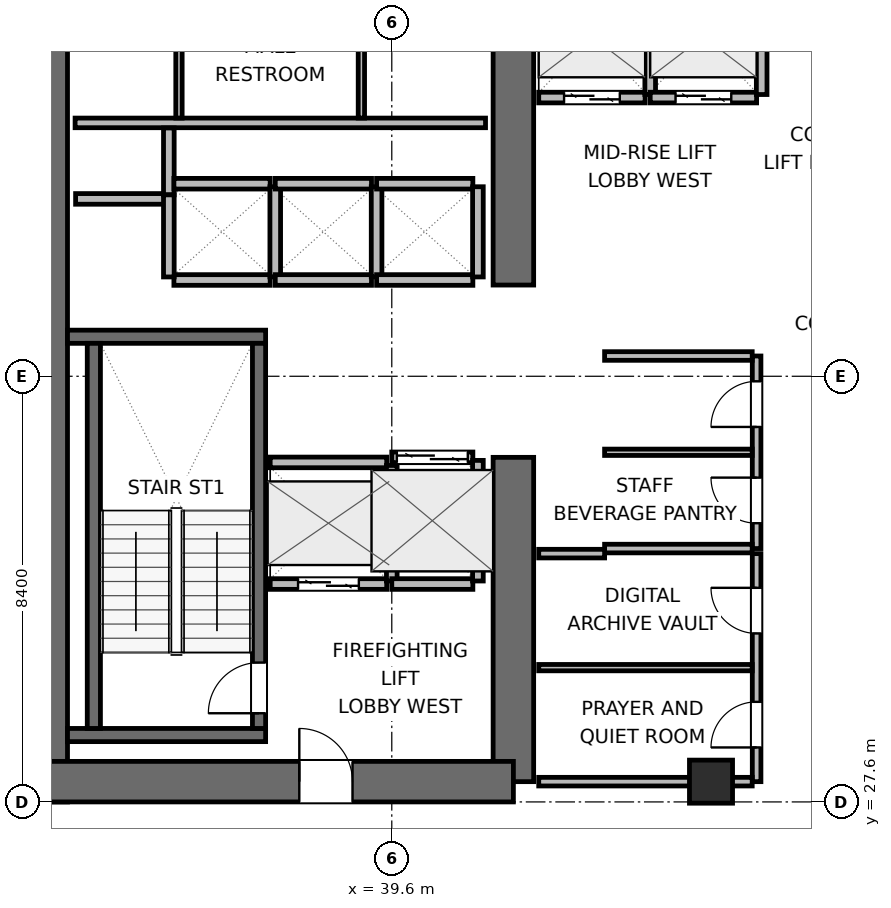
"""IFC4 building model, lengths in metres.
Left out: names, types, materials, properties, quantities, classifications, styles, units other than length and angle.
Written with IfcOpenShell. Run it as: python <this file> out.ifc"""

import sys

from ifc_helpers import new_model, si_unit, direction, frame, frame_2d, origin, origin_2d, place, context, subcontext, project, spatial, rectangle, extrude, element, fill, save


model = new_model("IFC4")
c1 = context("Model", 3, precision=1e-05, world=origin(), true_north=direction((0.0, 1.0)))
c2 = subcontext(c1, "Body", "Model", "MODEL_VIEW")
j1 = project(units=[si_unit("LENGTHUNIT", "METRE"), si_unit("PLANEANGLEUNIT", "RADIAN")], contexts=[c1])
p1 = place(None, origin())
s1 = spatial("IfcSite", under=j1, at=p1, CompositionType="ELEMENT")
p2 = place(p1, origin())
s2 = spatial("IfcBuilding", under=s1, at=p2, CompositionType="ELEMENT")
p3 = place(p2, frame((0.0, 0.0, 141.6)))
s3 = spatial("IfcBuildingStorey", under=s2, at=p3, CompositionType="ELEMENT", Elevation=141.6)
p4 = place(p3, frame((32.8, 27.6, 0.0), z_axis=(0.0, 0.0, 1.0), x_axis=(0.0, 1.0, 0.0)))
e1 = element("IfcWall", 1, at=p4, inside=s3, PredefinedType="SHEAR", context=c2, shape_type="SweptSolid", body=[
    extrude(rectangle(XDim=16.8, YDim=0.8, at=frame_2d((8.4, 0.0))), origin(), (0.0, 0.0, 1.0), 3.9),
])
p5 = place(p3, frame((42.0, 28.0, 0.0), z_axis=(0.0, 0.0, 1.0), x_axis=(0.0, 1.0, 0.0)))
e2 = element("IfcWall", 2, at=p5, inside=s3, PredefinedType="SHEAR", context=c2, shape_type="SweptSolid", body=[
    extrude(rectangle(XDim=6.4, YDim=0.8, at=frame_2d((3.2, 0.0))), origin(), (0.0, 0.0, 1.0), 3.9),
])
p6 = place(p3, frame((42.0, 37.8, 0.0), z_axis=(0.0, 0.0, 1.0), x_axis=(0.0, 1.0, 0.0)))
e3 = element("IfcWall", 3, at=p6, inside=s3, PredefinedType="SHEAR", context=c2, shape_type="SweptSolid", body=[
    extrude(rectangle(XDim=6.2, YDim=0.8, at=frame_2d((3.1, 0.0))), origin(), (0.0, 0.0, 1.0), 3.9),
])
p7 = place(p3, frame((32.8, 28.0, 0.0), z_axis=(0.0, 0.0, 1.0), x_axis=(1.0, 0.0, 0.0)))
e4 = element("IfcWall", 4, at=p7, inside=s3, PredefinedType="SHEAR", context=c2, shape_type="SweptSolid", body=[
    extrude(rectangle(XDim=9.2, YDim=0.8, at=frame_2d((4.6, 0.0))), origin(), (0.0, 0.0, 1.0), 3.9),
])
p8 = place(p7, frame((4.975, 0.0, 0.0)))
e5 = element("IfcOpeningElement", 5, at=p8, cuts=e4, PredefinedType="OPENING", context=c2, shape_type="SweptSolid", body=[
    extrude(rectangle(XDim=1.05, YDim=2.04, at=frame_2d((0.525, 1.02))), frame((0.0, 0.41, 0.0), z_axis=(0.0, -1.0, 0.0), x_axis=(1.0, 0.0, 0.0)), (0.0, 0.0, 1.0), 0.82),
])
for number, where, z_axis, x_axis in (
    (6, (33.2, 28.92, 0.0), (0.0, 0.0, 1.0), (1.0, 0.0, 0.0)),
    (7, (33.2, 36.78, 0.0), (0.0, 0.0, 1.0), (1.0, 0.0, 0.0)),
):
    element("IfcWall", number, at=place(p3, frame(where, z_axis=z_axis, x_axis=x_axis)), inside=s3, PredefinedType="SHEAR", context=c2, shape_type="SweptSolid", body=[
        extrude(rectangle(XDim=3.91, YDim=0.26, at=frame_2d((1.955, 0.0))), origin(), (0.0, 0.0, 1.0), 3.9),
    ])
p9 = place(p3, frame((33.72, 29.05, 0.0), z_axis=(0.0, 0.0, 1.0), x_axis=(0.0, 1.0, 0.0)))
e8 = element("IfcWall", 8, at=p9, inside=s3, PredefinedType="SHEAR", context=c2, shape_type="SweptSolid", body=[
    extrude(rectangle(XDim=7.6, YDim=0.26, at=frame_2d((3.8, 0.0))), origin(), (0.0, 0.0, 1.0), 3.9),
])
p10 = place(p3, frame((36.98, 29.05, 0.0), z_axis=(0.0, 0.0, 1.0), x_axis=(0.0, 1.0, 0.0)))
e9 = element("IfcWall", 9, at=p10, inside=s3, PredefinedType="SHEAR", context=c2, shape_type="SweptSolid", body=[
    extrude(rectangle(XDim=7.6, YDim=0.26, at=frame_2d((3.8, 0.0))), origin(), (0.0, 0.0, 1.0), 3.9),
])
p11 = place(p10, frame((0.3, 0.0, 0.0)))
e10 = element("IfcOpeningElement", 10, at=p11, cuts=e9, PredefinedType="OPENING", context=c2, shape_type="SweptSolid", body=[
    extrude(rectangle(XDim=1.0, YDim=2.04, at=frame_2d((0.5, 1.02))), frame((0.0, 0.14, 0.0), z_axis=(0.0, -1.0, 0.0), x_axis=(1.0, 0.0, 0.0)), (0.0, 0.0, 1.0), 0.28),
])
p12 = place(p3, frame((45.9, 28.0, 0.0), z_axis=(0.0, 0.0, 1.0), x_axis=(1.0, 0.0, 0.0)))
e11 = element("IfcColumn", 11, at=p12, inside=s3, PredefinedType="COLUMN", context=c2, shape_type="SweptSolid", body=[
    extrude(rectangle(XDim=0.85, YDim=0.85, at=origin_2d()), origin(), (0.0, 0.0, 1.0), 3.9),
])
p13 = place(p3, frame((33.35, 41.0, 0.0), z_axis=(0.0, 0.0, 1.0), x_axis=(1.0, 0.0, 0.0)))
e12 = element("IfcWall", 12, at=p13, inside=s3, PredefinedType="PLUMBINGWALL", context=c2, shape_type="SweptSolid", body=[
    extrude(rectangle(XDim=8.1, YDim=0.19, at=frame_2d((4.05, 0.0))), origin(), (0.0, 0.0, 1.0), 3.6),
])
for number, where, z_axis, x_axis in (
    (13, (35.4, 41.095, 0.0), (0.0, 0.0, 1.0), (0.0, 1.0, 0.0)),
    (14, (39.0, 41.095, 0.0), (0.0, 0.0, 1.0), (0.0, 1.0, 0.0)),
):
    element("IfcWall", number, at=place(p3, frame(where, z_axis=z_axis, x_axis=x_axis)), inside=s3, PredefinedType="PARTITIONING", context=c2, shape_type="SweptSolid", body=[
        extrude(rectangle(XDim=2.355, YDim=0.125, at=frame_2d((1.177, 0.0))), origin(), (0.0, 0.0, 1.0), 3.6),
    ])
p14 = place(p3, frame((33.36, 39.5, 0.0), z_axis=(0.0, 0.0, 1.0), x_axis=(1.0, 0.0, 0.0)))
e15 = element("IfcWall", 15, at=p14, inside=s3, PredefinedType="PARTITIONING", context=c2, shape_type="SweptSolid", body=[
    extrude(rectangle(XDim=1.86, YDim=0.21, at=frame_2d((0.93, 0.0))), origin(), (0.0, 0.0, 1.0), 3.6),
])
p15 = place(p3, frame((35.2, 39.58, 0.0), z_axis=(0.0, 0.0, 1.0), x_axis=(0.0, 1.0, 0.0)))
e16 = element("IfcWall", 16, at=p15, inside=s3, PredefinedType="PARTITIONING", context=c2, shape_type="SweptSolid", body=[
    extrude(rectangle(XDim=1.32, YDim=0.21, at=frame_2d((0.66, 0.0))), origin(), (0.0, 0.0, 1.0), 3.6),
])
p16 = place(p3, frame((37.2, 31.9, 0.0), z_axis=(0.0, 0.0, 1.0), x_axis=(1.0, 0.0, 0.0)))
e17 = element("IfcWall", 17, at=p16, inside=s3, PredefinedType="PARTITIONING", context=c2, shape_type="SweptSolid", body=[
    extrude(rectangle(XDim=2.3, YDim=0.21, at=frame_2d((1.15, 0.0))), origin(), (0.0, 0.0, 1.0), 3.6),
])
p17 = place(p16, frame((0.55, 0.0, 0.0)))
e18 = element("IfcOpeningElement", 18, at=p17, cuts=e17, PredefinedType="OPENING", context=c2, shape_type="SweptSolid", body=[
    extrude(rectangle(XDim=1.2, YDim=2.04, at=frame_2d((0.6, 1.02))), frame((0.0, 0.115, 0.0), z_axis=(0.0, -1.0, 0.0), x_axis=(1.0, 0.0, 0.0)), (0.0, 0.0, 1.0), 0.23),
])
p18 = place(p3, frame((37.2, 34.3, 0.0), z_axis=(0.0, 0.0, 1.0), x_axis=(1.0, 0.0, 0.0)))
e19 = element("IfcWall", 19, at=p18, inside=s3, PredefinedType="PARTITIONING", context=c2, shape_type="SweptSolid", body=[
    extrude(rectangle(XDim=2.3, YDim=0.21, at=frame_2d((1.15, 0.0))), origin(), (0.0, 0.0, 1.0), 3.6),
])
p19 = place(p3, frame((39.6, 31.96, 0.0), z_axis=(0.0, 0.0, 1.0), x_axis=(0.0, 1.0, 0.0)))
e20 = element("IfcWall", 20, at=p19, inside=s3, PredefinedType="PARTITIONING", context=c2, shape_type="SweptSolid", body=[
    extrude(rectangle(XDim=2.28, YDim=0.21, at=frame_2d((1.14, 0.0))), origin(), (0.0, 0.0, 1.0), 3.6),
])
p20 = place(p3, frame((39.6, 34.4, 0.0), z_axis=(0.0, 0.0, 1.0), x_axis=(1.0, 0.0, 0.0)))
e21 = element("IfcWall", 21, at=p20, inside=s3, PredefinedType="PARTITIONING", context=c2, shape_type="SweptSolid", body=[
    extrude(rectangle(XDim=1.6, YDim=0.21, at=frame_2d((0.8, 0.0))), origin(), (0.0, 0.0, 1.0), 3.6),
])
p21 = place(p20, frame((0.1, 0.0, 0.0)))
e22 = element("IfcOpeningElement", 22, at=p21, cuts=e21, PredefinedType="OPENING", context=c2, shape_type="SweptSolid", body=[
    extrude(rectangle(XDim=1.4, YDim=2.06, at=frame_2d((0.7, 1.03))), frame((0.0, 0.115, 0.0), z_axis=(0.0, -1.0, 0.0), x_axis=(1.0, 0.0, 0.0)), (0.0, 0.0, 1.0), 0.23),
])
p22 = place(p3, frame((39.6, 31.9, 0.0), z_axis=(0.0, 0.0, 1.0), x_axis=(1.0, 0.0, 0.0)))
e23 = element("IfcWall", 23, at=p22, inside=s3, PredefinedType="PARTITIONING", context=c2, shape_type="SweptSolid", body=[
    extrude(rectangle(XDim=1.6, YDim=0.21, at=frame_2d((0.8, 0.0))), origin(), (0.0, 0.0, 1.0), 3.6),
])
p23 = place(p3, frame((41.3, 31.96, 0.0), z_axis=(0.0, 0.0, 1.0), x_axis=(0.0, 1.0, 0.0)))
e24 = element("IfcWall", 24, at=p23, inside=s3, PredefinedType="PARTITIONING", context=c2, shape_type="SweptSolid", body=[
    extrude(rectangle(XDim=2.38, YDim=0.21, at=frame_2d((1.19, 0.0))), origin(), (0.0, 0.0, 1.0), 3.6),
])
p24 = place(p3, frame((42.5, 41.5, 0.0), z_axis=(0.0, 0.0, 1.0), x_axis=(1.0, 0.0, 0.0)))
e25 = element("IfcWall", 25, at=p24, inside=s3, PredefinedType="PARTITIONING", context=c2, shape_type="SweptSolid", body=[
    extrude(rectangle(XDim=2.1, YDim=0.21, at=frame_2d((1.05, 0.0))), origin(), (0.0, 0.0, 1.0), 3.6),
])
p25 = place(p24, frame((0.5, 0.0, 0.0)))
e26 = element("IfcOpeningElement", 26, at=p25, cuts=e25, PredefinedType="OPENING", context=c2, shape_type="SweptSolid", body=[
    extrude(rectangle(XDim=1.1, YDim=2.04, at=frame_2d((0.55, 1.02))), frame((0.0, 0.115, 0.0), z_axis=(0.0, -1.0, 0.0), x_axis=(1.0, 0.0, 0.0)), (0.0, 0.0, 1.0), 0.23),
])
p26 = place(p3, frame((44.7, 41.56, 0.0), z_axis=(0.0, 0.0, 1.0), x_axis=(0.0, 1.0, 0.0)))
e27 = element("IfcWall", 27, at=p26, inside=s3, PredefinedType="PARTITIONING", context=c2, shape_type="SweptSolid", body=[
    extrude(rectangle(XDim=2.28, YDim=0.21, at=frame_2d((1.14, 0.0))), origin(), (0.0, 0.0, 1.0), 3.6),
])
p27 = place(p3, frame((44.7, 41.5, 0.0), z_axis=(0.0, 0.0, 1.0), x_axis=(1.0, 0.0, 0.0)))
e28 = element("IfcWall", 28, at=p27, inside=s3, PredefinedType="PARTITIONING", context=c2, shape_type="SweptSolid", body=[
    extrude(rectangle(XDim=2.1, YDim=0.21, at=frame_2d((1.05, 0.0))), origin(), (0.0, 0.0, 1.0), 3.6),
])
p28 = place(p27, frame((0.5, 0.0, 0.0)))
e29 = element("IfcOpeningElement", 29, at=p28, cuts=e28, PredefinedType="OPENING", context=c2, shape_type="SweptSolid", body=[
    extrude(rectangle(XDim=1.1, YDim=2.04, at=frame_2d((0.55, 1.02))), frame((0.0, 0.115, 0.0), z_axis=(0.0, -1.0, 0.0), x_axis=(1.0, 0.0, 0.0)), (0.0, 0.0, 1.0), 0.23),
])
p29 = place(p3, frame((46.9, 41.56, 0.0), z_axis=(0.0, 0.0, 1.0), x_axis=(0.0, 1.0, 0.0)))
e30 = element("IfcWall", 30, at=p29, inside=s3, PredefinedType="PARTITIONING", context=c2, shape_type="SweptSolid", body=[
    extrude(rectangle(XDim=2.28, YDim=0.21, at=frame_2d((1.14, 0.0))), origin(), (0.0, 0.0, 1.0), 3.6),
])
for number, where, z_axis, x_axis in (
    (31, (35.3, 37.9, 0.0), (0.0, 0.0, 1.0), (1.0, 0.0, 0.0)),
    (32, (35.3, 39.8, 0.0), (0.0, 0.0, 1.0), (1.0, 0.0, 0.0)),
):
    element("IfcWall", number, at=place(p3, frame(where, z_axis=z_axis, x_axis=x_axis)), inside=s3, PredefinedType="PARTITIONING", context=c2, shape_type="SweptSolid", body=[
        extrude(rectangle(XDim=1.9, YDim=0.21, at=frame_2d((0.95, 0.0))), origin(), (0.0, 0.0, 1.0), 3.6),
    ])
p30 = place(p3, frame((35.2, 37.96, 0.0), z_axis=(0.0, 0.0, 1.0), x_axis=(0.0, 1.0, 0.0)))
e33 = element("IfcWall", 33, at=p30, inside=s3, PredefinedType="PARTITIONING", context=c2, shape_type="SweptSolid", body=[
    extrude(rectangle(XDim=1.62, YDim=0.21, at=frame_2d((0.81, 0.0))), origin(), (0.0, 0.0, 1.0), 3.6),
])
p31 = place(p3, frame((37.3, 37.96, 0.0), z_axis=(0.0, 0.0, 1.0), x_axis=(0.0, 1.0, 0.0)))
e34 = element("IfcWall", 34, at=p31, inside=s3, PredefinedType="PARTITIONING", context=c2, shape_type="SweptSolid", body=[
    extrude(rectangle(XDim=1.78, YDim=0.21, at=frame_2d((0.89, 0.0))), origin(), (0.0, 0.0, 1.0), 3.6),
])
for number, where, z_axis, x_axis in (
    (35, (37.3, 37.9, 0.0), (0.0, 0.0, 1.0), (1.0, 0.0, 0.0)),
    (36, (37.3, 39.8, 0.0), (0.0, 0.0, 1.0), (1.0, 0.0, 0.0)),
):
    element("IfcWall", number, at=place(p3, frame(where, z_axis=z_axis, x_axis=x_axis)), inside=s3, PredefinedType="PARTITIONING", context=c2, shape_type="SweptSolid", body=[
        extrude(rectangle(XDim=1.9, YDim=0.21, at=frame_2d((0.95, 0.0))), origin(), (0.0, 0.0, 1.0), 3.6),
    ])
p32 = place(p3, frame((39.3, 37.96, 0.0), z_axis=(0.0, 0.0, 1.0), x_axis=(0.0, 1.0, 0.0)))
e37 = element("IfcWall", 37, at=p32, inside=s3, PredefinedType="PARTITIONING", context=c2, shape_type="SweptSolid", body=[
    extrude(rectangle(XDim=1.78, YDim=0.21, at=frame_2d((0.89, 0.0))), origin(), (0.0, 0.0, 1.0), 3.6),
])
for number, where, z_axis, x_axis in (
    (38, (39.3, 37.9, 0.0), (0.0, 0.0, 1.0), (1.0, 0.0, 0.0)),
    (39, (39.3, 39.8, 0.0), (0.0, 0.0, 1.0), (1.0, 0.0, 0.0)),
):
    element("IfcWall", number, at=place(p3, frame(where, z_axis=z_axis, x_axis=x_axis)), inside=s3, PredefinedType="PARTITIONING", context=c2, shape_type="SweptSolid", body=[
        extrude(rectangle(XDim=1.9, YDim=0.21, at=frame_2d((0.95, 0.0))), origin(), (0.0, 0.0, 1.0), 3.6),
    ])
p33 = place(p3, frame((41.3, 37.96, 0.0), z_axis=(0.0, 0.0, 1.0), x_axis=(0.0, 1.0, 0.0)))
e40 = element("IfcWall", 40, at=p33, inside=s3, PredefinedType="PARTITIONING", context=c2, shape_type="SweptSolid", body=[
    extrude(rectangle(XDim=1.78, YDim=0.21, at=frame_2d((0.89, 0.0))), origin(), (0.0, 0.0, 1.0), 3.6),
])
p34 = place(p3, frame((46.8, 32.6, 0.0), z_axis=(0.0, 0.0, 1.0), x_axis=(0.0, 1.0, 0.0)))
e41 = element("IfcWall", 41, at=p34, inside=s3, PredefinedType="PARTITIONING", context=c2, shape_type="SweptSolid", body=[
    extrude(rectangle(XDim=3.8, YDim=0.17, at=frame_2d((1.9, 0.0))), origin(), (0.0, 0.0, 1.0), 3.6),
])
p35 = place(p34, frame((0.5, 0.0, 0.0)))
e42 = element("IfcOpeningElement", 42, at=p35, cuts=e41, PredefinedType="OPENING", context=c2, shape_type="SweptSolid", body=[
    extrude(rectangle(XDim=0.9, YDim=2.02, at=frame_2d((0.45, 1.01))), frame((0.0, 0.095, 0.0), z_axis=(0.0, -1.0, 0.0), x_axis=(1.0, 0.0, 0.0)), (0.0, 0.0, 1.0), 0.19),
])
p36 = place(p34, frame((2.4, 0.0, 0.0)))
e43 = element("IfcOpeningElement", 43, at=p36, cuts=e41, PredefinedType="OPENING", context=c2, shape_type="SweptSolid", body=[
    extrude(rectangle(XDim=0.9, YDim=2.02, at=frame_2d((0.45, 1.01))), frame((0.0, 0.095, 0.0), z_axis=(0.0, -1.0, 0.0), x_axis=(1.0, 0.0, 0.0)), (0.0, 0.0, 1.0), 0.19),
])
for number, where, z_axis, x_axis in (
    (44, (43.8, 32.6, 0.0), (0.0, 0.0, 1.0), (1.0, 0.0, 0.0)),
    (45, (43.8, 36.4, 0.0), (0.0, 0.0, 1.0), (1.0, 0.0, 0.0)),
):
    element("IfcWall", number, at=place(p3, frame(where, z_axis=z_axis, x_axis=x_axis)), inside=s3, PredefinedType="PARTITIONING", context=c2, shape_type="SweptSolid", body=[
        extrude(rectangle(XDim=2.913, YDim=0.17, at=frame_2d((1.457, 0.0))), origin(), (0.0, 0.0, 1.0), 3.6),
    ])
p37 = place(p3, frame((43.8, 34.5, 0.0), z_axis=(0.0, 0.0, 1.0), x_axis=(1.0, 0.0, 0.0)))
e46 = element("IfcWall", 46, at=p37, inside=s3, PredefinedType="PARTITIONING", context=c2, shape_type="SweptSolid", body=[
    extrude(rectangle(XDim=2.913, YDim=0.125, at=frame_2d((1.457, 0.0))), origin(), (0.0, 0.0, 1.0), 3.6),
])
p38 = place(p3, frame((46.8, 28.0, 0.0), z_axis=(0.0, 0.0, 1.0), x_axis=(0.0, 1.0, 0.0)))
e47 = element("IfcWall", 47, at=p38, inside=s3, PredefinedType="PARTITIONING", context=c2, shape_type="SweptSolid", body=[
    extrude(rectangle(XDim=4.5, YDim=0.17, at=frame_2d((2.25, 0.0))), origin(), (0.0, 0.0, 1.0), 3.6),
])
p39 = place(p38, frame((0.675, 0.0, 0.0)))
e48 = element("IfcOpeningElement", 48, at=p39, cuts=e47, PredefinedType="OPENING", context=c2, shape_type="SweptSolid", body=[
    extrude(rectangle(XDim=0.9, YDim=2.02, at=frame_2d((0.45, 1.01))), frame((0.0, 0.095, 0.0), z_axis=(0.0, -1.0, 0.0), x_axis=(1.0, 0.0, 0.0)), (0.0, 0.0, 1.0), 0.19),
])
p40 = place(p38, frame((2.925, 0.0, 0.0)))
e49 = element("IfcOpeningElement", 49, at=p40, cuts=e47, PredefinedType="OPENING", context=c2, shape_type="SweptSolid", body=[
    extrude(rectangle(XDim=0.9, YDim=2.02, at=frame_2d((0.45, 1.01))), frame((0.0, 0.095, 0.0), z_axis=(0.0, -1.0, 0.0), x_axis=(1.0, 0.0, 0.0)), (0.0, 0.0, 1.0), 0.19),
])
p41 = place(p3, frame((42.5, 28.0, 0.0), z_axis=(0.0, 0.0, 1.0), x_axis=(1.0, 0.0, 0.0)))
e50 = element("IfcWall", 50, at=p41, inside=s3, PredefinedType="PARTITIONING", context=c2, shape_type="SweptSolid", body=[
    extrude(rectangle(XDim=4.213, YDim=0.17, at=frame_2d((2.106, 0.0))), origin(), (0.0, 0.0, 1.0), 2.485),
])
p42 = place(p3, frame((42.5, 32.5, 0.0), z_axis=(0.0, 0.0, 1.0), x_axis=(1.0, 0.0, 0.0)))
e51 = element("IfcWall", 51, at=p42, inside=s3, PredefinedType="PARTITIONING", context=c2, shape_type="SweptSolid", body=[
    extrude(rectangle(XDim=1.3, YDim=0.17, at=frame_2d((0.65, 0.0))), origin(), (0.0, 0.0, 1.0), 3.6),
])
p43 = place(p3, frame((42.5, 30.25, 0.0), z_axis=(0.0, 0.0, 1.0), x_axis=(1.0, 0.0, 0.0)))
e52 = element("IfcWall", 52, at=p43, inside=s3, PredefinedType="PARTITIONING", context=c2, shape_type="SweptSolid", body=[
    extrude(rectangle(XDim=4.213, YDim=0.125, at=frame_2d((2.106, 0.0))), origin(), (0.0, 0.0, 1.0), 3.6),
])
p44 = place(p11, origin())
e53 = element("IfcDoor", 53, at=p44, inside=s3, OperationType="SINGLE_SWING_LEFT", PredefinedType="DOOR", context=c2, shape_type="SweptSolid", body=[
    extrude(rectangle(XDim=1.0, YDim=2.04, at=frame_2d((0.5, 1.02))), frame((0.0, 0.025, 0.0), z_axis=(0.0, -1.0, 0.0), x_axis=(1.0, 0.0, 0.0)), (0.0, 0.0, 1.0), 0.05),
])
fill(e10, e53)
p45 = place(p17, origin())
e54 = element("IfcDoor", 54, at=p45, inside=s3, OperationType="DOUBLE_DOOR_SLIDING", PredefinedType="DOOR", context=c2, shape_type="SweptSolid", body=[
    extrude(rectangle(XDim=1.2, YDim=2.04, at=frame_2d((0.6, 1.02))), frame((0.0, 0.025, 0.0), z_axis=(0.0, -1.0, 0.0), x_axis=(1.0, 0.0, 0.0)), (0.0, 0.0, 1.0), 0.05),
])
fill(e18, e54)
p46 = place(p21, origin())
e55 = element("IfcDoor", 55, at=p46, inside=s3, OperationType="DOUBLE_DOOR_SLIDING", PredefinedType="DOOR", context=c2, shape_type="SweptSolid", body=[
    extrude(rectangle(XDim=1.4, YDim=2.06, at=frame_2d((0.7, 1.03))), frame((0.0, 0.025, 0.0), z_axis=(0.0, -1.0, 0.0), x_axis=(1.0, 0.0, 0.0)), (0.0, 0.0, 1.0), 0.05),
])
fill(e22, e55)
p47 = place(p25, origin())
e56 = element("IfcDoor", 56, at=p47, inside=s3, OperationType="DOUBLE_DOOR_SLIDING", PredefinedType="DOOR", context=c2, shape_type="SweptSolid", body=[
    extrude(rectangle(XDim=1.1, YDim=2.04, at=frame_2d((0.55, 1.02))), frame((0.0, 0.025, 0.0), z_axis=(0.0, -1.0, 0.0), x_axis=(1.0, 0.0, 0.0)), (0.0, 0.0, 1.0), 0.05),
])
fill(e26, e56)
p48 = place(p28, origin())
e57 = element("IfcDoor", 57, at=p48, inside=s3, OperationType="DOUBLE_DOOR_SLIDING", PredefinedType="DOOR", context=c2, shape_type="SweptSolid", body=[
    extrude(rectangle(XDim=1.1, YDim=2.04, at=frame_2d((0.55, 1.02))), frame((0.0, 0.025, 0.0), z_axis=(0.0, -1.0, 0.0), x_axis=(1.0, 0.0, 0.0)), (0.0, 0.0, 1.0), 0.05),
])
fill(e29, e57)
p49 = place(p8, origin())
e58 = element("IfcDoor", 58, at=p49, inside=s3, OperationType="SINGLE_SWING_LEFT", PredefinedType="DOOR", context=c2, shape_type="SweptSolid", body=[
    extrude(rectangle(XDim=1.05, YDim=2.04, at=frame_2d((0.525, 1.02))), frame((0.0, 0.025, 0.0), z_axis=(0.0, -1.0, 0.0), x_axis=(1.0, 0.0, 0.0)), (0.0, 0.0, 1.0), 0.05),
])
fill(e5, e58)
p50 = place(p35, origin())
e59 = element("IfcDoor", 59, at=p50, inside=s3, OperationType="SINGLE_SWING_RIGHT", PredefinedType="DOOR", context=c2, shape_type="SweptSolid", body=[
    extrude(rectangle(XDim=0.9, YDim=2.02, at=frame_2d((0.45, 1.01))), frame((0.0, 0.025, 0.0), z_axis=(0.0, -1.0, 0.0), x_axis=(1.0, 0.0, 0.0)), (0.0, 0.0, 1.0), 0.05),
])
fill(e42, e59)
p51 = place(p36, origin())
e60 = element("IfcDoor", 60, at=p51, inside=s3, OperationType="SINGLE_SWING_LEFT", PredefinedType="DOOR", context=c2, shape_type="SweptSolid", body=[
    extrude(rectangle(XDim=0.9, YDim=2.02, at=frame_2d((0.45, 1.01))), frame((0.0, 0.025, 0.0), z_axis=(0.0, -1.0, 0.0), x_axis=(1.0, 0.0, 0.0)), (0.0, 0.0, 1.0), 0.05),
])
fill(e43, e60)
p52 = place(p39, origin())
e61 = element("IfcDoor", 61, at=p52, inside=s3, OperationType="SINGLE_SWING_LEFT", PredefinedType="DOOR", context=c2, shape_type="SweptSolid", body=[
    extrude(rectangle(XDim=0.9, YDim=2.02, at=frame_2d((0.45, 1.01))), frame((0.0, 0.025, 0.0), z_axis=(0.0, -1.0, 0.0), x_axis=(1.0, 0.0, 0.0)), (0.0, 0.0, 1.0), 0.05),
])
fill(e48, e61)
p53 = place(p40, origin())
e62 = element("IfcDoor", 62, at=p53, inside=s3, OperationType="SINGLE_SWING_RIGHT", PredefinedType="DOOR", context=c2, shape_type="SweptSolid", body=[
    extrude(rectangle(XDim=0.9, YDim=2.02, at=frame_2d((0.45, 1.01))), frame((0.0, 0.025, 0.0), z_axis=(0.0, -1.0, 0.0), x_axis=(1.0, 0.0, 0.0)), (0.0, 0.0, 1.0), 0.05),
])
fill(e49, e62)
save(model, sys.argv[1])
